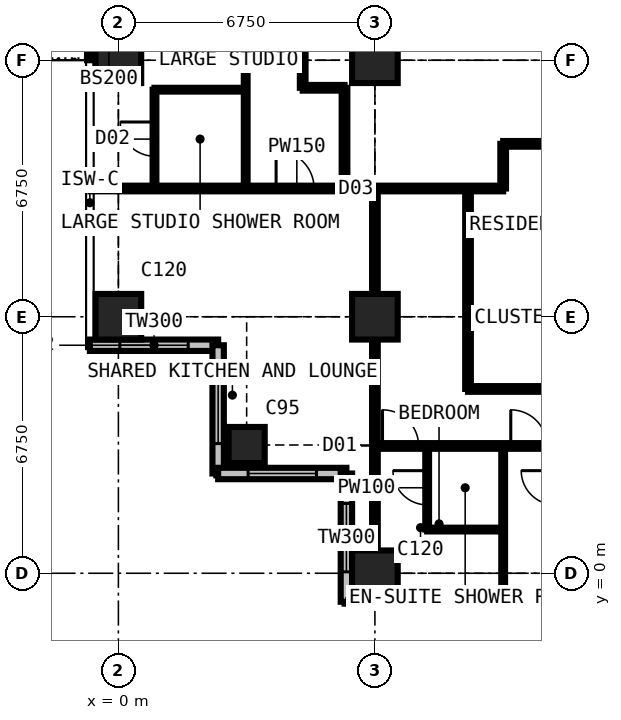
"""IFC4 building model, lengths in metres.
Left out: names, types, materials, properties, quantities, classifications, styles, units other than length and angle.
Written with IfcOpenShell. Run it as: python <this file> out.ifc"""

import sys

from ifc_helpers import new_model, si_unit, direction, frame, frame_2d, origin, origin_2d, place, context, subcontext, project, spatial, rectangle, extrude, element, fill, save


model = new_model("IFC4")
c1 = context("Model", 3, precision=1e-05, world=origin(), true_north=direction((0.0, 1.0)))
c2 = subcontext(c1, "Body", "Model", "MODEL_VIEW")
j1 = project(units=[si_unit("LENGTHUNIT", "METRE"), si_unit("PLANEANGLEUNIT", "RADIAN")], contexts=[c1])
p1 = place(None, origin())
s1 = spatial("IfcSite", under=j1, at=p1, CompositionType="ELEMENT")
p2 = place(p1, origin())
s2 = spatial("IfcBuilding", under=s1, at=p2, CompositionType="ELEMENT")
p3 = place(p2, frame((0.0, 0.0, 178.2)))
s3 = spatial("IfcBuildingStorey", under=s2, at=p3, CompositionType="ELEMENT", Elevation=178.2)
for number, where, z_axis, x_axis in (
    (1, (0.0, 6.75, 0.0), (0.0, 0.0, 1.0), (1.0, 0.0, 0.0)),
    (2, (0.0, 13.5, 0.0), (0.0, 0.0, 1.0), (1.0, 0.0, 0.0)),
):
    element("IfcColumn", number, at=place(p3, frame(where, z_axis=z_axis, x_axis=x_axis)), inside=s3, PredefinedType="COLUMN", context=c2, shape_type="SweptSolid", body=[
        extrude(rectangle(XDim=1.2, YDim=1.2, at=origin_2d()), origin(), (0.0, 0.0, 1.0), 3.6),
    ])
p4 = place(p3, frame((3.375, 3.375, 0.0), z_axis=(0.0, 0.0, 1.0), x_axis=(1.0, 0.0, 0.0)))
e3 = element("IfcColumn", 3, at=p4, inside=s3, PredefinedType="COLUMN", context=c2, shape_type="SweptSolid", body=[
    extrude(rectangle(XDim=0.95, YDim=0.95, at=origin_2d()), origin(), (0.0, 0.0, 1.0), 3.6),
])
for number, where, z_axis, x_axis in (
    (4, (6.75, 0.0, 0.0), (0.0, 0.0, 1.0), (1.0, 0.0, 0.0)),
    (5, (6.75, 6.75, 0.0), (0.0, 0.0, 1.0), (1.0, 0.0, 0.0)),
    (6, (6.75, 13.5, 0.0), (0.0, 0.0, 1.0), (1.0, 0.0, 0.0)),
):
    element("IfcColumn", number, at=place(p3, frame(where, z_axis=z_axis, x_axis=x_axis)), inside=s3, PredefinedType="COLUMN", context=c2, shape_type="SweptSolid", body=[
        extrude(rectangle(XDim=1.2, YDim=1.2, at=origin_2d()), origin(), (0.0, 0.0, 1.0), 3.6),
    ])
p5 = place(p3, frame((-0.75, 13.5, 0.0), z_axis=(0.0, 0.0, 1.0), x_axis=(0.0, 1.0, 0.0)))
e7 = element("IfcWall", 7, at=p5, inside=s3, PredefinedType="SOLIDWALL", context=c2, shape_type="SweptSolid", body=[
    extrude(rectangle(XDim=6.75, YDim=0.15, at=frame_2d((3.375, 0.0))), origin(), (0.0, 0.0, 1.0), 3.375),
])
p6 = place(p5, frame((0.613, 0.0, 0.0)))
e8 = element("IfcOpeningElement", 8, at=p6, cuts=e7, PredefinedType="OPENING", context=c2, shape_type="SweptSolid", body=[
    extrude(rectangle(XDim=1.0, YDim=2.2, at=frame_2d((0.5, 1.1))), frame((0.0, 0.085, 0.0), z_axis=(0.0, -1.0, 0.0), x_axis=(1.0, 0.0, 0.0)), (0.0, 0.0, 1.0), 0.17),
])
p7 = place(p5, frame((1.725, 0.0, 0.9)))
e9 = element("IfcOpeningElement", 9, at=p7, cuts=e7, PredefinedType="OPENING", context=c2, shape_type="SweptSolid", body=[
    extrude(rectangle(XDim=1.2, YDim=1.8, at=frame_2d((0.6, 0.9))), frame((0.0, 0.085, 0.0), z_axis=(0.0, -1.0, 0.0), x_axis=(1.0, 0.0, 0.0)), (0.0, 0.0, 1.0), 0.17),
])
p8 = place(p5, frame((5.137, 0.0, 0.0)))
e10 = element("IfcOpeningElement", 10, at=p8, cuts=e7, PredefinedType="OPENING", context=c2, shape_type="SweptSolid", body=[
    extrude(rectangle(XDim=1.0, YDim=2.2, at=frame_2d((0.5, 1.1))), frame((0.0, 0.085, 0.0), z_axis=(0.0, -1.0, 0.0), x_axis=(1.0, 0.0, 0.0)), (0.0, 0.0, 1.0), 0.17),
])
p9 = place(p5, frame((3.825, 0.0, 0.9)))
e11 = element("IfcOpeningElement", 11, at=p9, cuts=e7, PredefinedType="OPENING", context=c2, shape_type="SweptSolid", body=[
    extrude(rectangle(XDim=1.2, YDim=1.8, at=frame_2d((0.6, 0.9))), frame((0.0, 0.085, 0.0), z_axis=(0.0, -1.0, 0.0), x_axis=(1.0, 0.0, 0.0)), (0.0, 0.0, 1.0), 0.17),
])
p10 = place(p3, frame((-0.75, 6.0, 0.0), z_axis=(0.0, 0.0, 1.0), x_axis=(1.0, 0.0, 0.0)))
e12 = element("IfcWall", 12, at=p10, inside=s3, PredefinedType="SOLIDWALL", context=c2, shape_type="SweptSolid", body=[
    extrude(rectangle(XDim=3.375, YDim=0.3, at=frame_2d((1.688, 0.0))), origin(), (0.0, 0.0, 1.0), 3.375),
])
p11 = place(p10, frame((0.788, 0.0, 0.6)))
e13 = element("IfcOpeningElement", 13, at=p11, cuts=e12, PredefinedType="OPENING", context=c2, shape_type="SweptSolid", body=[
    extrude(rectangle(XDim=1.8, YDim=2.1, at=frame_2d((0.9, 1.05))), frame((0.0, 0.16, 0.0), z_axis=(0.0, -1.0, 0.0), x_axis=(1.0, 0.0, 0.0)), (0.0, 0.0, 1.0), 0.32),
])
p12 = place(p3, frame((2.625, 6.0, 0.0), z_axis=(0.0, 0.0, 1.0), x_axis=(0.0, -1.0, 0.0)))
e14 = element("IfcWall", 14, at=p12, inside=s3, PredefinedType="SOLIDWALL", context=c2, shape_type="SweptSolid", body=[
    extrude(rectangle(XDim=3.375, YDim=0.3, at=frame_2d((1.688, 0.0))), origin(), (0.0, 0.0, 1.0), 3.375),
])
p13 = place(p12, frame((0.788, 0.0, 0.6)))
e15 = element("IfcOpeningElement", 15, at=p13, cuts=e14, PredefinedType="OPENING", context=c2, shape_type="SweptSolid", body=[
    extrude(rectangle(XDim=1.8, YDim=2.1, at=frame_2d((0.9, 1.05))), frame((0.0, 0.16, 0.0), z_axis=(0.0, -1.0, 0.0), x_axis=(1.0, 0.0, 0.0)), (0.0, 0.0, 1.0), 0.32),
])
p14 = place(p3, frame((2.625, 2.625, 0.0), z_axis=(0.0, 0.0, 1.0), x_axis=(1.0, 0.0, 0.0)))
e16 = element("IfcWall", 16, at=p14, inside=s3, PredefinedType="SOLIDWALL", context=c2, shape_type="SweptSolid", body=[
    extrude(rectangle(XDim=3.375, YDim=0.3, at=frame_2d((1.688, 0.0))), origin(), (0.0, 0.0, 1.0), 3.375),
])
p15 = place(p14, frame((0.788, 0.0, 0.6)))
e17 = element("IfcOpeningElement", 17, at=p15, cuts=e16, PredefinedType="OPENING", context=c2, shape_type="SweptSolid", body=[
    extrude(rectangle(XDim=1.8, YDim=2.1, at=frame_2d((0.9, 1.05))), frame((0.0, 0.16, 0.0), z_axis=(0.0, -1.0, 0.0), x_axis=(1.0, 0.0, 0.0)), (0.0, 0.0, 1.0), 0.32),
])
p16 = place(p3, frame((6.0, 2.625, 0.0), z_axis=(0.0, 0.0, 1.0), x_axis=(0.0, -1.0, 0.0)))
e18 = element("IfcWall", 18, at=p16, inside=s3, PredefinedType="SOLIDWALL", context=c2, shape_type="SweptSolid", body=[
    extrude(rectangle(XDim=3.375, YDim=0.3, at=frame_2d((1.688, 0.0))), origin(), (0.0, 0.0, 1.0), 3.375),
])
p17 = place(p16, frame((0.788, 0.0, 0.6)))
e19 = element("IfcOpeningElement", 19, at=p17, cuts=e18, PredefinedType="OPENING", context=c2, shape_type="SweptSolid", body=[
    extrude(rectangle(XDim=1.8, YDim=2.1, at=frame_2d((0.9, 1.05))), frame((0.0, 0.16, 0.0), z_axis=(0.0, -1.0, 0.0), x_axis=(1.0, 0.0, 0.0)), (0.0, 0.0, 1.0), 0.32),
])
p18 = place(p3, frame((-0.734, 10.125, 0.0), z_axis=(0.0, 0.0, 1.0), x_axis=(1.0, 0.0, 0.0)))
e20 = element("IfcWall", 20, at=p18, inside=s3, PredefinedType="PARTITIONING", context=c2, shape_type="SweptSolid", body=[
    extrude(rectangle(XDim=10.859, YDim=0.15, at=frame_2d((5.429, 0.0))), origin(), (0.0, 0.0, 1.0), 3.375),
])
p19 = place(p18, frame((4.884, 0.0, 0.0)))
e21 = element("IfcOpeningElement", 21, at=p19, cuts=e20, PredefinedType="OPENING", context=c2, shape_type="SweptSolid", body=[
    extrude(rectangle(XDim=1.0, YDim=2.2, at=frame_2d((0.5, 1.1))), frame((0.0, 0.085, 0.0), z_axis=(0.0, -1.0, 0.0), x_axis=(1.0, 0.0, 0.0)), (0.0, 0.0, 1.0), 0.17),
])
p20 = place(p3, frame((0.95, 10.125, 0.0), z_axis=(0.0, 0.0, 1.0), x_axis=(0.0, 1.0, 0.0)))
e22 = element("IfcWall", 22, at=p20, inside=s3, PredefinedType="PARTITIONING", context=c2, shape_type="SweptSolid", body=[
    extrude(rectangle(XDim=2.6, YDim=0.1, at=frame_2d((1.3, 0.0))), origin(), (0.0, 0.0, 1.0), 3.375),
])
p21 = place(p20, frame((0.85, 0.0, 0.0)))
e23 = element("IfcOpeningElement", 23, at=p21, cuts=e22, PredefinedType="OPENING", context=c2, shape_type="SweptSolid", body=[
    extrude(rectangle(XDim=0.9, YDim=2.2, at=frame_2d((0.45, 1.1))), frame((0.0, 0.06, 0.0), z_axis=(0.0, -1.0, 0.0), x_axis=(1.0, 0.0, 0.0)), (0.0, 0.0, 1.0), 0.12),
])
p22 = place(p3, frame((0.95, 12.725, 0.0), z_axis=(0.0, 0.0, 1.0), x_axis=(1.0, 0.0, 0.0)))
e24 = element("IfcWall", 24, at=p22, inside=s3, PredefinedType="PARTITIONING", context=c2, shape_type="SweptSolid", body=[
    extrude(rectangle(XDim=2.4, YDim=0.1, at=frame_2d((1.2, 0.0))), origin(), (0.0, 0.0, 1.0), 3.375),
])
p23 = place(p3, frame((3.35, 10.125, 0.0), z_axis=(0.0, 0.0, 1.0), x_axis=(0.0, 1.0, 0.0)))
e25 = element("IfcWall", 25, at=p23, inside=s3, PredefinedType="PARTITIONING", context=c2, shape_type="SweptSolid", body=[
    extrude(rectangle(XDim=16.875, YDim=0.1, at=frame_2d((8.438, 0.0))), origin(), (0.0, 0.0, 1.0), 3.375),
])
p24 = place(p23, frame((13.7, 0.0, 0.0)))
e26 = element("IfcOpeningElement", 26, at=p24, cuts=e25, PredefinedType="OPENING", context=c2, shape_type="SweptSolid", body=[
    extrude(rectangle(XDim=0.95, YDim=2.2, at=frame_2d((0.475, 1.1))), frame((0.0, 0.06, 0.0), z_axis=(0.0, -1.0, 0.0), x_axis=(1.0, 0.0, 0.0)), (0.0, 0.0, 1.0), 0.12),
])
p25 = place(p23, frame((4.2, 0.0, 0.0)))
e27 = element("IfcOpeningElement", 27, at=p25, cuts=e25, PredefinedType="OPENING", context=c2, shape_type="SweptSolid", body=[
    extrude(rectangle(XDim=0.95, YDim=2.2, at=frame_2d((0.475, 1.1))), frame((0.0, 0.06, 0.0), z_axis=(0.0, -1.0, 0.0), x_axis=(1.0, 0.0, 0.0)), (0.0, 0.0, 1.0), 0.12),
])
p26 = place(p23, frame((10.95, 0.0, 0.0)))
e28 = element("IfcOpeningElement", 28, at=p26, cuts=e25, PredefinedType="OPENING", context=c2, shape_type="SweptSolid", body=[
    extrude(rectangle(XDim=0.95, YDim=2.2, at=frame_2d((0.475, 1.1))), frame((0.0, 0.06, 0.0), z_axis=(0.0, -1.0, 0.0), x_axis=(1.0, 0.0, 0.0)), (0.0, 0.0, 1.0), 0.12),
])
p27 = place(p3, frame((4.85, 12.775, 0.0), z_axis=(0.0, 0.0, 1.0), x_axis=(0.0, 1.0, 0.0)))
e29 = element("IfcWall", 29, at=p27, inside=s3, PredefinedType="PARTITIONING", context=c2, shape_type="SweptSolid", body=[
    extrude(rectangle(XDim=8.113, YDim=0.15, at=frame_2d((4.056, 0.0))), origin(), (0.0, 0.0, 1.0), 3.375),
])
p28 = place(p27, frame((3.6, 0.0, 0.0)))
e30 = element("IfcOpeningElement", 30, at=p28, cuts=e29, PredefinedType="OPENING", context=c2, shape_type="SweptSolid", body=[
    extrude(rectangle(XDim=0.95, YDim=2.2, at=frame_2d((0.475, 1.1))), frame((0.0, 0.085, 0.0), z_axis=(0.0, -1.0, 0.0), x_axis=(1.0, 0.0, 0.0)), (0.0, 0.0, 1.0), 0.17),
])
p29 = place(p3, frame((4.85, 12.775, 0.0), z_axis=(0.0, 0.0, 1.0), x_axis=(1.0, 0.0, 0.0)))
e31 = element("IfcWall", 31, at=p29, inside=s3, PredefinedType="PARTITIONING", context=c2, shape_type="SweptSolid", body=[
    extrude(rectangle(XDim=1.1, YDim=0.15, at=frame_2d((0.55, 0.0))), origin(), (0.0, 0.0, 1.0), 3.375),
])
p30 = place(p3, frame((5.95, 10.125, 0.0), z_axis=(0.0, 0.0, 1.0), x_axis=(0.0, 1.0, 0.0)))
e32 = element("IfcWall", 32, at=p30, inside=s3, PredefinedType="PARTITIONING", context=c2, shape_type="SweptSolid", body=[
    extrude(rectangle(XDim=2.65, YDim=0.15, at=frame_2d((1.325, 0.0))), origin(), (0.0, 0.0, 1.0), 3.375),
])
p31 = place(p3, frame((6.75, -0.734, 0.0), z_axis=(0.0, 0.0, 1.0), x_axis=(0.0, 1.0, 0.0)))
e33 = element("IfcWall", 33, at=p31, inside=s3, PredefinedType="PARTITIONING", context=c2, shape_type="SweptSolid", body=[
    extrude(rectangle(XDim=10.859, YDim=0.15, at=frame_2d((5.429, 0.0))), origin(), (0.0, 0.0, 1.0), 2.877),
])
p32 = place(p3, frame((6.75, 3.35, 0.0), z_axis=(0.0, 0.0, 1.0), x_axis=(1.0, 0.0, 0.0)))
e34 = element("IfcWall", 34, at=p32, inside=s3, PredefinedType="PARTITIONING", context=c2, shape_type="SweptSolid", body=[
    extrude(rectangle(XDim=20.25, YDim=0.15, at=frame_2d((10.125, 0.0))), origin(), (0.0, 0.0, 1.0), 3.375),
])
p33 = place(p32, frame((0.2, 0.0, 0.0)))
e35 = element("IfcOpeningElement", 35, at=p33, cuts=e34, PredefinedType="OPENING", context=c2, shape_type="SweptSolid", body=[
    extrude(rectangle(XDim=0.95, YDim=2.2, at=frame_2d((0.475, 1.1))), frame((0.0, 0.085, 0.0), z_axis=(0.0, -1.0, 0.0), x_axis=(1.0, 0.0, 0.0)), (0.0, 0.0, 1.0), 0.17),
])
p34 = place(p32, frame((3.575, 0.0, 0.0)))
e36 = element("IfcOpeningElement", 36, at=p34, cuts=e34, PredefinedType="OPENING", context=c2, shape_type="SweptSolid", body=[
    extrude(rectangle(XDim=0.95, YDim=2.2, at=frame_2d((0.475, 1.1))), frame((0.0, 0.085, 0.0), z_axis=(0.0, -1.0, 0.0), x_axis=(1.0, 0.0, 0.0)), (0.0, 0.0, 1.0), 0.17),
])
p35 = place(p32, frame((6.95, 0.0, 0.0)))
e37 = element("IfcOpeningElement", 37, at=p35, cuts=e34, PredefinedType="OPENING", context=c2, shape_type="SweptSolid", body=[
    extrude(rectangle(XDim=0.95, YDim=2.2, at=frame_2d((0.475, 1.1))), frame((0.0, 0.085, 0.0), z_axis=(0.0, -1.0, 0.0), x_axis=(1.0, 0.0, 0.0)), (0.0, 0.0, 1.0), 0.17),
])
p36 = place(p32, frame((15.1, 0.0, 0.0)))
e38 = element("IfcOpeningElement", 38, at=p36, cuts=e34, PredefinedType="OPENING", context=c2, shape_type="SweptSolid", body=[
    extrude(rectangle(XDim=0.95, YDim=2.2, at=frame_2d((0.475, 1.1))), frame((0.0, 0.085, 0.0), z_axis=(0.0, -1.0, 0.0), x_axis=(1.0, 0.0, 0.0)), (0.0, 0.0, 1.0), 0.17),
])
p37 = place(p32, frame((10.325, 0.0, 0.0)))
e39 = element("IfcOpeningElement", 39, at=p37, cuts=e34, PredefinedType="OPENING", context=c2, shape_type="SweptSolid", body=[
    extrude(rectangle(XDim=0.95, YDim=2.2, at=frame_2d((0.475, 1.1))), frame((0.0, 0.085, 0.0), z_axis=(0.0, -1.0, 0.0), x_axis=(1.0, 0.0, 0.0)), (0.0, 0.0, 1.0), 0.17),
])
p38 = place(p3, frame((8.125, 1.15, 0.0), z_axis=(0.0, 0.0, 1.0), x_axis=(0.0, 1.0, 0.0)))
e40 = element("IfcWall", 40, at=p38, inside=s3, PredefinedType="PARTITIONING", context=c2, shape_type="SweptSolid", body=[
    extrude(rectangle(XDim=2.2, YDim=0.1, at=frame_2d((1.1, 0.0))), origin(), (0.0, 0.0, 1.0), 3.375),
])
p39 = place(p38, frame((0.65, 0.0, 0.0)))
e41 = element("IfcOpeningElement", 41, at=p39, cuts=e40, PredefinedType="OPENING", context=c2, shape_type="SweptSolid", body=[
    extrude(rectangle(XDim=0.9, YDim=2.2, at=frame_2d((0.45, 1.1))), frame((0.0, 0.06, 0.0), z_axis=(0.0, -1.0, 0.0), x_axis=(1.0, 0.0, 0.0)), (0.0, 0.0, 1.0), 0.12),
])
p40 = place(p3, frame((8.125, 1.15, 0.0), z_axis=(0.0, 0.0, 1.0), x_axis=(1.0, 0.0, 0.0)))
e42 = element("IfcWall", 42, at=p40, inside=s3, PredefinedType="PARTITIONING", context=c2, shape_type="SweptSolid", body=[
    extrude(rectangle(XDim=2.0, YDim=0.1, at=frame_2d((1.0, 0.0))), origin(), (0.0, 0.0, 1.0), 3.375),
])
p41 = place(p3, frame((9.2, 4.85, 0.0), z_axis=(0.0, 0.0, 1.0), x_axis=(0.0, 1.0, 0.0)))
e43 = element("IfcWall", 43, at=p41, inside=s3, PredefinedType="PARTITIONING", context=c2, shape_type="SweptSolid", body=[
    extrude(rectangle(XDim=5.275, YDim=0.15, at=frame_2d((2.637, 0.0))), origin(), (0.0, 0.0, 1.0), 3.375),
])
p42 = place(p3, frame((9.2, 4.85, 0.0), z_axis=(0.0, 0.0, 1.0), x_axis=(1.0, 0.0, 0.0)))
e44 = element("IfcWall", 44, at=p42, inside=s3, PredefinedType="PARTITIONING", context=c2, shape_type="SweptSolid", body=[
    extrude(rectangle(XDim=5.575, YDim=0.15, at=frame_2d((2.788, 0.0))), origin(), (0.0, 0.0, 1.0), 3.375),
])
p43 = place(p3, frame((10.125, -0.734, 0.0), z_axis=(0.0, 0.0, 1.0), x_axis=(0.0, 1.0, 0.0)))
e45 = element("IfcWall", 45, at=p43, inside=s3, PredefinedType="PARTITIONING", context=c2, shape_type="SweptSolid", body=[
    extrude(rectangle(XDim=4.084, YDim=0.1, at=frame_2d((2.042, 0.0))), origin(), (0.0, 0.0, 1.0), 3.375),
])
p44 = place(p3, frame((10.125, 10.125, 0.0), z_axis=(0.0, 0.0, 1.0), x_axis=(0.0, 1.0, 0.0)))
e46 = element("IfcWall", 46, at=p44, inside=s3, PredefinedType="PARTITIONING", context=c2, shape_type="SweptSolid", body=[
    extrude(rectangle(XDim=1.175, YDim=0.15, at=frame_2d((0.587, 0.0))), origin(), (0.0, 0.0, 1.0), 3.375),
])
p45 = place(p3, frame((10.125, 11.3, 0.0), z_axis=(0.0, 0.0, 1.0), x_axis=(1.0, 0.0, 0.0)))
e47 = element("IfcWall", 47, at=p45, inside=s3, PredefinedType="PARTITIONING", context=c2, shape_type="SweptSolid", body=[
    extrude(rectangle(XDim=20.25, YDim=0.15, at=frame_2d((10.125, 0.0))), origin(), (0.0, 0.0, 1.0), 3.375),
])
p46 = place(p45, frame((5.2, 0.0, 0.0)))
e48 = element("IfcOpeningElement", 48, at=p46, cuts=e47, PredefinedType="OPENING", context=c2, shape_type="SweptSolid", body=[
    extrude(rectangle(XDim=1.0, YDim=2.2, at=frame_2d((0.5, 1.1))), frame((0.0, 0.085, 0.0), z_axis=(0.0, -1.0, 0.0), x_axis=(1.0, 0.0, 0.0)), (0.0, 0.0, 1.0), 0.17),
])
p47 = place(p45, frame((11.312, 0.0, 0.0)))
e49 = element("IfcOpeningElement", 49, at=p47, cuts=e47, PredefinedType="OPENING", context=c2, shape_type="SweptSolid", body=[
    extrude(rectangle(XDim=1.0, YDim=2.2, at=frame_2d((0.5, 1.1))), frame((0.0, 0.085, 0.0), z_axis=(0.0, -1.0, 0.0), x_axis=(1.0, 0.0, 0.0)), (0.0, 0.0, 1.0), 0.17),
])
p48 = place(p45, frame((2.425, 0.0, 0.0)))
e50 = element("IfcOpeningElement", 50, at=p48, cuts=e47, PredefinedType="OPENING", context=c2, shape_type="SweptSolid", body=[
    extrude(rectangle(XDim=0.95, YDim=2.2, at=frame_2d((0.475, 1.1))), frame((0.0, 0.085, 0.0), z_axis=(0.0, -1.0, 0.0), x_axis=(1.0, 0.0, 0.0)), (0.0, 0.0, 1.0), 0.17),
])
p49 = place(p11, origin())
e51 = element("IfcWindow", 51, at=p49, inside=s3, PartitioningType="SINGLE_PANEL", PredefinedType="WINDOW", context=c2, shape_type="SweptSolid", body=[
    extrude(rectangle(XDim=1.8, YDim=2.1, at=frame_2d((0.9, 1.05))), frame((0.0, 0.03, 0.0), z_axis=(0.0, -1.0, 0.0), x_axis=(1.0, 0.0, 0.0)), (0.0, 0.0, 1.0), 0.06),
])
fill(e13, e51)
p50 = place(p13, origin())
e52 = element("IfcWindow", 52, at=p50, inside=s3, PartitioningType="SINGLE_PANEL", PredefinedType="WINDOW", context=c2, shape_type="SweptSolid", body=[
    extrude(rectangle(XDim=1.8, YDim=2.1, at=frame_2d((0.9, 1.05))), frame((0.0, 0.03, 0.0), z_axis=(0.0, -1.0, 0.0), x_axis=(1.0, 0.0, 0.0)), (0.0, 0.0, 1.0), 0.06),
])
fill(e15, e52)
p51 = place(p15, origin())
e53 = element("IfcWindow", 53, at=p51, inside=s3, PartitioningType="SINGLE_PANEL", PredefinedType="WINDOW", context=c2, shape_type="SweptSolid", body=[
    extrude(rectangle(XDim=1.8, YDim=2.1, at=frame_2d((0.9, 1.05))), frame((0.0, 0.03, 0.0), z_axis=(0.0, -1.0, 0.0), x_axis=(1.0, 0.0, 0.0)), (0.0, 0.0, 1.0), 0.06),
])
fill(e17, e53)
p52 = place(p17, origin())
e54 = element("IfcWindow", 54, at=p52, inside=s3, PartitioningType="SINGLE_PANEL", PredefinedType="WINDOW", context=c2, shape_type="SweptSolid", body=[
    extrude(rectangle(XDim=1.8, YDim=2.1, at=frame_2d((0.9, 1.05))), frame((0.0, 0.03, 0.0), z_axis=(0.0, -1.0, 0.0), x_axis=(1.0, 0.0, 0.0)), (0.0, 0.0, 1.0), 0.06),
])
fill(e19, e54)
p53 = place(p19, origin())
e55 = element("IfcDoor", 55, at=p53, inside=s3, OperationType="SINGLE_SWING_LEFT", PredefinedType="DOOR", context=c2, shape_type="SweptSolid", body=[
    extrude(rectangle(XDim=1.0, YDim=2.2, at=frame_2d((0.5, 1.1))), frame((0.0, 0.025, 0.0), z_axis=(0.0, -1.0, 0.0), x_axis=(1.0, 0.0, 0.0)), (0.0, 0.0, 1.0), 0.05),
])
fill(e21, e55)
p54 = place(p33, origin())
e56 = element("IfcDoor", 56, at=p54, inside=s3, OperationType="SINGLE_SWING_LEFT", PredefinedType="DOOR", context=c2, shape_type="SweptSolid", body=[
    extrude(rectangle(XDim=0.95, YDim=2.2, at=frame_2d((0.475, 1.1))), frame((0.0, 0.025, 0.0), z_axis=(0.0, -1.0, 0.0), x_axis=(1.0, 0.0, 0.0)), (0.0, 0.0, 1.0), 0.05),
])
fill(e35, e56)
p55 = place(p39, origin())
e57 = element("IfcDoor", 57, at=p55, inside=s3, OperationType="SINGLE_SWING_RIGHT", PredefinedType="DOOR", context=c2, shape_type="SweptSolid", body=[
    extrude(rectangle(XDim=0.9, YDim=2.2, at=frame_2d((0.45, 1.1))), frame((0.0, 0.025, 0.0), z_axis=(0.0, -1.0, 0.0), x_axis=(1.0, 0.0, 0.0)), (0.0, 0.0, 1.0), 0.05),
])
fill(e41, e57)
p56 = place(p34, origin())
e58 = element("IfcDoor", 58, at=p56, inside=s3, OperationType="SINGLE_SWING_LEFT", PredefinedType="DOOR", context=c2, shape_type="SweptSolid", body=[
    extrude(rectangle(XDim=0.95, YDim=2.2, at=frame_2d((0.475, 1.1))), frame((0.0, 0.025, 0.0), z_axis=(0.0, -1.0, 0.0), x_axis=(1.0, 0.0, 0.0)), (0.0, 0.0, 1.0), 0.05),
])
fill(e36, e58)
p57 = place(p21, origin())
e59 = element("IfcDoor", 59, at=p57, inside=s3, OperationType="SINGLE_SWING_RIGHT", PredefinedType="DOOR", context=c2, shape_type="SweptSolid", body=[
    extrude(rectangle(XDim=0.9, YDim=2.2, at=frame_2d((0.45, 1.1))), frame((0.0, 0.025, 0.0), z_axis=(0.0, -1.0, 0.0), x_axis=(1.0, 0.0, 0.0)), (0.0, 0.0, 1.0), 0.05),
])
fill(e23, e59)
save(model, sys.argv[1])
